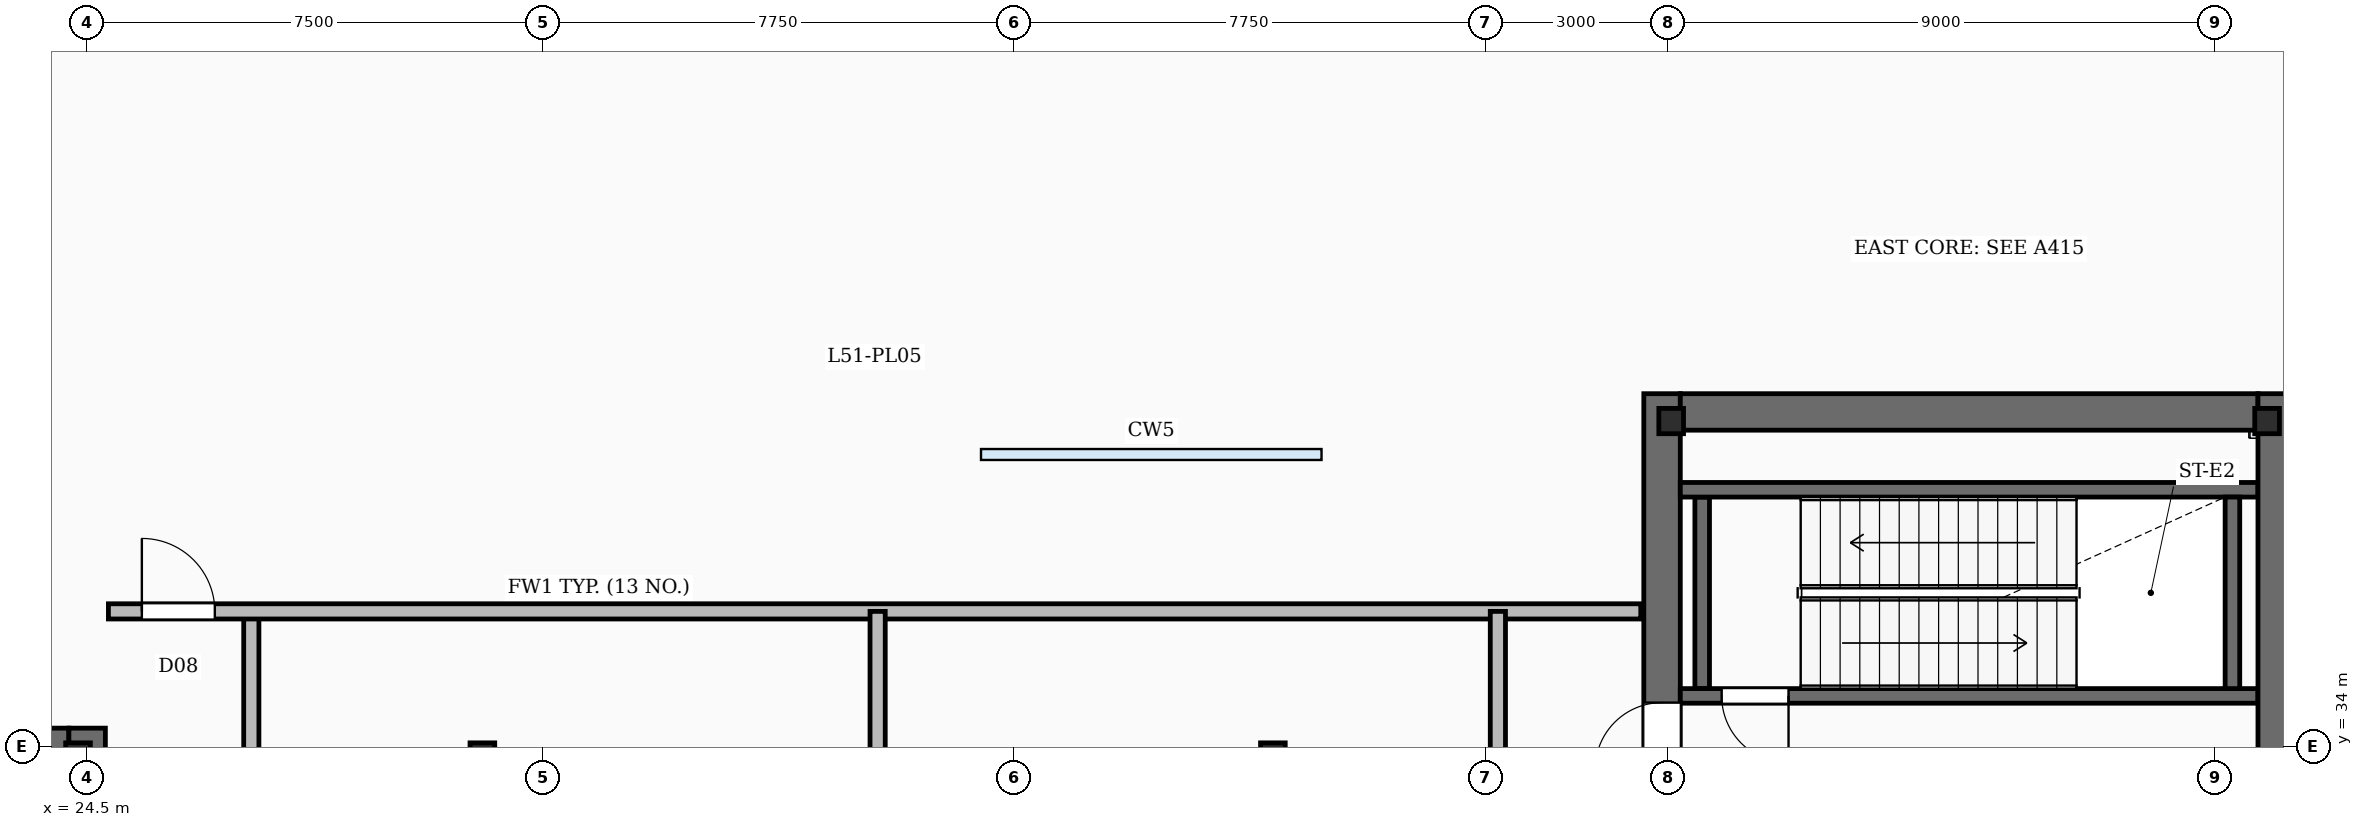
"""IFC4 building model, lengths in metres.
Left out: names, types, materials, properties, quantities, classifications, styles, units other than length and angle.
Written with IfcOpenShell. Run it as: python <this file> out.ifc"""

import sys

from ifc_helpers import new_model, si_unit, direction, frame, frame_2d, origin, origin_2d, place, context, subcontext, project, spatial, rectangle, circle, i_section, extrude, element, fill, save


model = new_model("IFC4")
c1 = context("Model", 3, precision=1e-05, world=origin(), true_north=direction((0.0, 1.0)))
c2 = subcontext(c1, "Body", "Model", "MODEL_VIEW")
j1 = project(units=[si_unit("LENGTHUNIT", "METRE"), si_unit("PLANEANGLEUNIT", "RADIAN")], contexts=[c1])
p1 = place(None, origin())
s1 = spatial("IfcSite", under=j1, at=p1, CompositionType="ELEMENT")
p2 = place(p1, origin())
s2 = spatial("IfcBuilding", under=s1, at=p2, CompositionType="ELEMENT")
p3 = place(p2, frame((0.0, 0.0, 210.95)))
s3 = spatial("IfcBuildingStorey", under=s2, at=p3, CompositionType="ELEMENT", Elevation=210.95)
p4 = place(p3, frame((24.5, 19.0, -0.42), z_axis=(0.0, 0.0, 1.0), x_axis=(0.0, 1.0, 0.0)))
e1 = element("IfcWall", 1, at=p4, inside=s3, PredefinedType="SHEAR", context=c2, shape_type="SweptSolid", body=[
    extrude(rectangle(XDim=15.3, YDim=0.6, at=frame_2d((7.65, 0.0))), origin(), (0.0, 0.0, 1.0), 5.17),
])
p5 = place(p4, frame((2.5, 0.0, 0.42)))
e2 = element("IfcOpeningElement", 2, at=p5, cuts=e1, PredefinedType="OPENING", context=c2, shape_type="SweptSolid", body=[
    extrude(rectangle(XDim=1.05, YDim=2.15, at=frame_2d((0.525, 1.075))), frame((0.0, 0.31, 0.0), z_axis=(0.0, -1.0, 0.0), x_axis=(1.0, 0.0, 0.0)), (0.0, 0.0, 1.0), 0.62),
])
p6 = place(p4, frame((7.0, 0.0, 0.42)))
e3 = element("IfcOpeningElement", 3, at=p6, cuts=e1, PredefinedType="OPENING", context=c2, shape_type="SweptSolid", body=[
    extrude(rectangle(XDim=1.05, YDim=2.15, at=frame_2d((0.525, 1.075))), frame((0.0, 0.31, 0.0), z_axis=(0.0, -1.0, 0.0), x_axis=(1.0, 0.0, 0.0)), (0.0, 0.0, 1.0), 0.62),
])
p7 = place(p3, frame((14.7, 34.0, -0.42), z_axis=(0.0, 0.0, 1.0), x_axis=(1.0, 0.0, 0.0)))
e4 = element("IfcWall", 4, at=p7, inside=s3, PredefinedType="SHEAR", context=c2, shape_type="SweptSolid", body=[
    extrude(rectangle(XDim=9.5, YDim=0.6, at=frame_2d((4.75, 0.0))), origin(), (0.0, 0.0, 1.0), 5.17),
])
p8 = place(p3, frame((50.4, 19.0, -0.42), z_axis=(0.0, 0.0, 1.0), x_axis=(0.0, 1.0, 0.0)))
e5 = element("IfcWall", 5, at=p8, inside=s3, PredefinedType="SHEAR", context=c2, shape_type="SweptSolid", body=[
    extrude(rectangle(XDim=20.8, YDim=0.6, at=frame_2d((10.4, 0.0))), origin(), (0.0, 0.0, 1.0), 5.17),
])
p9 = place(p8, frame((2.5, 0.0, 0.42)))
e6 = element("IfcOpeningElement", 6, at=p9, cuts=e5, PredefinedType="OPENING", context=c2, shape_type="SweptSolid", body=[
    extrude(rectangle(XDim=1.05, YDim=2.15, at=frame_2d((0.525, 1.075))), frame((0.0, 0.31, 0.0), z_axis=(0.0, -1.0, 0.0), x_axis=(1.0, 0.0, 0.0)), (0.0, 0.0, 1.0), 0.62),
])
p10 = place(p8, frame((8.65, 0.0, 0.42)))
e7 = element("IfcOpeningElement", 7, at=p10, cuts=e5, PredefinedType="OPENING", context=c2, shape_type="SweptSolid", body=[
    extrude(rectangle(XDim=1.05, YDim=2.15, at=frame_2d((0.525, 1.075))), frame((0.0, 0.31, 0.0), z_axis=(0.0, -1.0, 0.0), x_axis=(1.0, 0.0, 0.0)), (0.0, 0.0, 1.0), 0.62),
])
p11 = place(p8, frame((14.62, 0.0, 0.42)))
e8 = element("IfcOpeningElement", 8, at=p11, cuts=e5, PredefinedType="OPENING", context=c2, shape_type="SweptSolid", body=[
    extrude(rectangle(XDim=1.1, YDim=2.15, at=frame_2d((0.55, 1.075))), frame((0.0, 0.31, 0.0), z_axis=(0.0, -1.0, 0.0), x_axis=(1.0, 0.0, 0.0)), (0.0, 0.0, 1.0), 0.62),
])
p12 = place(p3, frame((60.5, 19.0, -0.42), z_axis=(0.0, 0.0, 1.0), x_axis=(0.0, 1.0, 0.0)))
e9 = element("IfcWall", 9, at=p12, inside=s3, PredefinedType="SHEAR", context=c2, shape_type="SweptSolid", body=[
    extrude(rectangle(XDim=20.8, YDim=0.6, at=frame_2d((10.4, 0.0))), origin(), (0.0, 0.0, 1.0), 5.17),
])
p13 = place(p3, frame((50.7, 39.5, -0.42), z_axis=(0.0, 0.0, 1.0), x_axis=(1.0, 0.0, 0.0)))
e10 = element("IfcWall", 10, at=p13, inside=s3, PredefinedType="SHEAR", context=c2, shape_type="SweptSolid", body=[
    extrude(rectangle(XDim=9.5, YDim=0.6, at=frame_2d((4.75, 0.0))), origin(), (0.0, 0.0, 1.0), 5.17),
])
for number, where, z_axis, x_axis in (
    (11, (24.35, 33.85, -0.42), (0.0, 0.0, 1.0), (1.0, 0.0, 0.0)),
    (12, (50.55, 39.35, -0.42), (0.0, 0.0, 1.0), (1.0, 0.0, 0.0)),
    (13, (60.35, 39.35, -0.42), (0.0, 0.0, 1.0), (1.0, 0.0, 0.0)),
    (14, (31.0, 33.85, -0.42), (0.0, 0.0, 1.0), (1.0, 0.0, 0.0)),
    (15, (44.0, 33.85, -0.42), (0.0, 0.0, 1.0), (1.0, 0.0, 0.0)),
):
    element("IfcColumn", number, at=place(p3, frame(where, z_axis=z_axis, x_axis=x_axis)), inside=s3, PredefinedType="COLUMN", context=c2, shape_type="SweptSolid", body=[
        extrude(i_section(OverallWidth=0.406, OverallDepth=0.416, WebThickness=0.03, FlangeThickness=0.048, FilletRadius=0.02, at=origin_2d()), origin(), (0.0, 0.0, 1.0), 5.17),
    ])
p14 = place(p3, frame((60.142, 50.537, 0.239), z_axis=(0.604043800873, -0.690537448082, 0.397855651491), x_axis=(0.752672008054, 0.658395662419, 0.0)))
e16 = element("IfcColumn", 16, at=p14, inside=s3, PredefinedType="COLUMN", context=c2, shape_type="SweptSolid", body=[
    extrude(circle(Radius=0.69, at=origin_2d()), origin(), (0.0, 0.0, 1.0), 9.685),
])
p15 = place(p3, frame((47.968, 50.643, 0.233), z_axis=(0.699651944389, -0.584203916872, 0.411330694484), x_axis=(0.640935571465, 0.767594680304, 0.0)))
e17 = element("IfcColumn", 17, at=p15, inside=s3, PredefinedType="COLUMN", context=c2, shape_type="SweptSolid", body=[
    extrude(circle(Radius=0.69, at=origin_2d()), origin(), (0.0, 0.0, 1.0), 9.396),
])
p16 = place(p3, frame((60.2, 34.83, 0.0), z_axis=(0.0, 0.0, 1.0), x_axis=(-1.0, 0.0, 0.0)))
e18 = element("IfcWall", 18, at=p16, inside=s3, PredefinedType="SOLIDWALL", context=c2, shape_type="SweptSolid", body=[
    extrude(rectangle(XDim=9.5, YDim=0.24, at=frame_2d((4.75, 0.0))), origin(), (0.0, 0.0, 1.0), 4.75),
])
p17 = place(p16, frame((7.72, 0.0, 0.0)))
e19 = element("IfcOpeningElement", 19, at=p17, cuts=e18, PredefinedType="OPENING", context=c2, shape_type="SweptSolid", body=[
    extrude(rectangle(XDim=1.1, YDim=2.15, at=frame_2d((0.55, 1.075))), frame((0.0, 0.13, 0.0), z_axis=(0.0, -1.0, 0.0), x_axis=(1.0, 0.0, 0.0)), (0.0, 0.0, 1.0), 0.26),
])
p18 = place(p3, frame((50.7, 38.22, 0.0), z_axis=(0.0, 0.0, 1.0), x_axis=(1.0, 0.0, 0.0)))
e20 = element("IfcWall", 20, at=p18, inside=s3, PredefinedType="SOLIDWALL", context=c2, shape_type="SweptSolid", body=[
    extrude(rectangle(XDim=9.5, YDim=0.24, at=frame_2d((4.75, 0.0))), origin(), (0.0, 0.0, 1.0), 4.75),
])
for number, where, z_axis, x_axis in (
    (21, (51.06, 34.95, 0.0), (0.0, 0.0, 1.0), (0.0, 1.0, 0.0)),
    (22, (59.78, 34.95, 0.0), (0.0, 0.0, 1.0), (0.0, 1.0, 0.0)),
):
    element("IfcWall", number, at=place(p3, frame(where, z_axis=z_axis, x_axis=x_axis)), inside=s3, PredefinedType="SOLIDWALL", context=c2, shape_type="SweptSolid", body=[
        extrude(rectangle(XDim=3.15, YDim=0.24, at=frame_2d((1.575, 0.0))), origin(), (0.0, 0.0, 1.0), 4.75),
    ])
p19 = place(p3, frame((37.5, 15.38, 0.0), z_axis=(0.0, 0.0, 1.0), x_axis=(0.0, 1.0, 0.0)))
e23 = element("IfcWall", 23, at=p19, inside=s3, PredefinedType="SOLIDWALL", context=c2, shape_type="SweptSolid", body=[
    extrude(rectangle(XDim=20.84, YDim=0.25, at=frame_2d((10.42, 0.0))), origin(), (0.0, 0.0, 1.0), 3.81),
])
p20 = place(p3, frame((24.85, 36.22, 0.0), z_axis=(0.0, 0.0, 1.0), x_axis=(1.0, 0.0, 0.0)))
e24 = element("IfcWall", 24, at=p20, inside=s3, PredefinedType="SOLIDWALL", context=c2, shape_type="SweptSolid", body=[
    extrude(rectangle(XDim=25.2, YDim=0.25, at=frame_2d((12.6, 0.0))), origin(), (0.0, 0.0, 1.0), 3.81),
])
p21 = place(p20, frame((0.55, 0.0, 0.0)))
e25 = element("IfcOpeningElement", 25, at=p21, cuts=e24, PredefinedType="OPENING", context=c2, shape_type="SweptSolid", body=[
    extrude(rectangle(XDim=1.2, YDim=2.2, at=frame_2d((0.6, 1.1))), frame((0.0, 0.135, 0.0), z_axis=(0.0, -1.0, 0.0), x_axis=(1.0, 0.0, 0.0)), (0.0, 0.0, 1.0), 0.27),
])
p22 = place(p3, frame((27.2, 15.38, 0.0), z_axis=(0.0, 0.0, 1.0), x_axis=(0.0, 1.0, 0.0)))
e26 = element("IfcWall", 26, at=p22, inside=s3, PredefinedType="SOLIDWALL", context=c2, shape_type="SweptSolid", body=[
    extrude(rectangle(XDim=20.84, YDim=0.25, at=frame_2d((10.42, 0.0))), origin(), (0.0, 0.0, 1.0), 3.81),
])
p23 = place(p22, frame((4.8, 0.0, 0.0)))
e27 = element("IfcOpeningElement", 27, at=p23, cuts=e26, PredefinedType="OPENING", context=c2, shape_type="SweptSolid", body=[
    extrude(rectangle(XDim=1.2, YDim=2.2, at=frame_2d((0.6, 1.1))), frame((0.0, 0.135, 0.0), z_axis=(0.0, -1.0, 0.0), x_axis=(1.0, 0.0, 0.0)), (0.0, 0.0, 1.0), 0.27),
])
p24 = place(p22, frame((14.5, 0.0, 0.0)))
e28 = element("IfcOpeningElement", 28, at=p24, cuts=e26, PredefinedType="OPENING", context=c2, shape_type="SweptSolid", body=[
    extrude(rectangle(XDim=1.2, YDim=2.2, at=frame_2d((0.6, 1.1))), frame((0.0, 0.135, 0.0), z_axis=(0.0, -1.0, 0.0), x_axis=(1.0, 0.0, 0.0)), (0.0, 0.0, 1.0), 0.27),
])
p25 = place(p3, frame((47.7, 15.38, 0.0), z_axis=(0.0, 0.0, 1.0), x_axis=(0.0, 1.0, 0.0)))
e29 = element("IfcWall", 29, at=p25, inside=s3, PredefinedType="SOLIDWALL", context=c2, shape_type="SweptSolid", body=[
    extrude(rectangle(XDim=20.84, YDim=0.25, at=frame_2d((10.42, 0.0))), origin(), (0.0, 0.0, 1.0), 3.81),
])
p26 = place(p25, frame((4.8, 0.0, 0.0)))
e30 = element("IfcOpeningElement", 30, at=p26, cuts=e29, PredefinedType="OPENING", context=c2, shape_type="SweptSolid", body=[
    extrude(rectangle(XDim=1.2, YDim=2.2, at=frame_2d((0.6, 1.1))), frame((0.0, 0.135, 0.0), z_axis=(0.0, -1.0, 0.0), x_axis=(1.0, 0.0, 0.0)), (0.0, 0.0, 1.0), 0.27),
])
p27 = place(p25, frame((14.5, 0.0, 0.0)))
e31 = element("IfcOpeningElement", 31, at=p27, cuts=e29, PredefinedType="OPENING", context=c2, shape_type="SweptSolid", body=[
    extrude(rectangle(XDim=1.2, YDim=2.2, at=frame_2d((0.6, 1.1))), frame((0.0, 0.135, 0.0), z_axis=(0.0, -1.0, 0.0), x_axis=(1.0, 0.0, 0.0)), (0.0, 0.0, 1.0), 0.27),
])
p28 = place(p11, origin())
e32 = element("IfcDoor", 32, at=p28, inside=s3, OperationType="SINGLE_SWING_LEFT", PredefinedType="DOOR", context=c2, shape_type="SweptSolid", body=[
    extrude(rectangle(XDim=1.1, YDim=2.15, at=frame_2d((0.55, 1.075))), frame((0.0, 0.025, 0.0), z_axis=(0.0, -1.0, 0.0), x_axis=(1.0, 0.0, 0.0)), (0.0, 0.0, 1.0), 0.05),
])
fill(e8, e32)
p29 = place(p17, origin())
e33 = element("IfcDoor", 33, at=p29, inside=s3, OperationType="SINGLE_SWING_LEFT", PredefinedType="DOOR", context=c2, shape_type="SweptSolid", body=[
    extrude(rectangle(XDim=1.1, YDim=2.15, at=frame_2d((0.55, 1.075))), frame((0.0, 0.025, 0.0), z_axis=(0.0, -1.0, 0.0), x_axis=(1.0, 0.0, 0.0)), (0.0, 0.0, 1.0), 0.05),
])
fill(e19, e33)
p30 = place(p21, origin())
e34 = element("IfcDoor", 34, at=p30, inside=s3, OperationType="SINGLE_SWING_LEFT", PredefinedType="DOOR", context=c2, shape_type="SweptSolid", body=[
    extrude(rectangle(XDim=1.2, YDim=2.2, at=frame_2d((0.6, 1.1))), frame((0.0, 0.025, 0.0), z_axis=(0.0, -1.0, 0.0), x_axis=(1.0, 0.0, 0.0)), (0.0, 0.0, 1.0), 0.05),
])
fill(e25, e34)
save(model, sys.argv[1])
